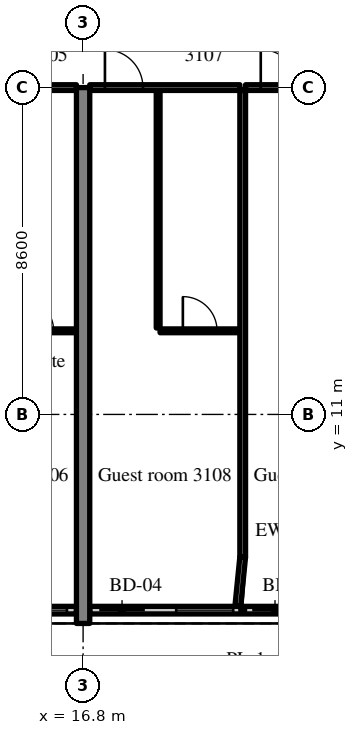
"""IFC4 building model, lengths in metres.
Left out: names, types, materials, properties, quantities, classifications, styles, units other than length and angle.
Written with IfcOpenShell. Run it as: python <this file> out.ifc"""

import sys

from ifc_helpers import new_model, si_unit, direction, frame, frame_2d, origin, place, context, subcontext, project, spatial, rectangle, extrude, source, transform, mapped, element, fill, save


model = new_model("IFC4")
c1 = context("Model", 3, precision=1e-05, world=origin(), true_north=direction((0.0, 1.0)))
c2 = subcontext(c1, "Body", "Model", "MODEL_VIEW")
j1 = project(units=[si_unit("LENGTHUNIT", "METRE"), si_unit("PLANEANGLEUNIT", "RADIAN")], contexts=[c1])
p1 = place(None, origin())
s1 = spatial("IfcSite", under=j1, at=p1, CompositionType="ELEMENT")
p2 = place(p1, origin())
s2 = spatial("IfcBuilding", under=s1, at=p2, CompositionType="ELEMENT")
p3 = place(p2, frame((0.0, 0.0, 129.4)))
s3 = spatial("IfcBuildingStorey", under=s2, at=p3, CompositionType="ELEMENT", Elevation=129.4)
m1 = source(origin(), c2, "Body", "SweptSolid", [
    extrude(rectangle(XDim=14.1, YDim=0.35, at=frame_2d((7.05, 0.0))), origin(), (0.0, 0.0, 1.0), 3.52),
])
p4 = place(p3, frame((16.8, 5.5, 0.0), z_axis=(0.0, 0.0, 1.0), x_axis=(0.0, 1.0, 0.0)))
e1 = element("IfcWall", 1, at=p4, inside=s3, PredefinedType="SHEAR", context=c2, shape_type="MappedRepresentation", body=[
    mapped(m1, transform((0.0, 0.0, 0.0), scale=1.0)),
])
m2 = source(origin(), c2, "Body", "SweptSolid", [
    extrude(rectangle(XDim=8.05, YDim=0.2, at=frame_2d((4.025, 0.0))), origin(), (0.0, 0.0, 1.0), 2.82),
])
p5 = place(p3, frame((8.575, 5.85, 0.0), z_axis=(0.0, 0.0, 1.0), x_axis=(1.0, 0.0, 0.0)))
e2 = element("IfcWall", 2, at=p5, inside=s3, PredefinedType="SOLIDWALL", context=c2, shape_type="MappedRepresentation", body=[
    mapped(m2, transform((0.0, 0.0, 0.0), scale=1.0)),
])
m3 = source(origin(), c2, "Body", "SweptSolid", [
    extrude(rectangle(XDim=1.2, YDim=2.4, at=frame_2d((0.6, 1.2))), frame((0.0, 0.11, 0.0), z_axis=(0.0, -1.0, 0.0), x_axis=(1.0, 0.0, 0.0)), (0.0, 0.0, 1.0), 0.22),
])
p6 = place(p5, frame((0.25, 0.0, 0.0)))
e3 = element("IfcOpeningElement", 3, at=p6, cuts=e2, PredefinedType="OPENING", context=c2, shape_type="MappedRepresentation", body=[
    mapped(m3, transform((0.0, 0.0, 0.0), scale=1.0)),
])
m4 = source(origin(), c2, "Body", "SweptSolid", [
    extrude(rectangle(XDim=1.5, YDim=1.5, at=frame_2d((0.75, 0.75))), frame((0.0, 0.11, 0.0), z_axis=(0.0, -1.0, 0.0), x_axis=(1.0, 0.0, 0.0)), (0.0, 0.0, 1.0), 0.22),
])
p7 = place(p5, frame((2.275, 0.0, 0.9)))
e4 = element("IfcOpeningElement", 4, at=p7, cuts=e2, PredefinedType="OPENING", context=c2, shape_type="MappedRepresentation", body=[
    mapped(m4, transform((0.0, 0.0, 0.0), scale=1.0)),
])
p8 = place(p5, frame((4.275, 0.0, 0.0)))
e5 = element("IfcOpeningElement", 5, at=p8, cuts=e2, PredefinedType="OPENING", context=c2, shape_type="MappedRepresentation", body=[
    mapped(m3, transform((0.0, 0.0, 0.0), scale=1.0)),
])
p9 = place(p5, frame((6.3, 0.0, 0.9)))
e6 = element("IfcOpeningElement", 6, at=p9, cuts=e2, PredefinedType="OPENING", context=c2, shape_type="MappedRepresentation", body=[
    mapped(m4, transform((0.0, 0.0, 0.0), scale=1.0)),
])
m5 = source(origin(), c2, "Body", "SweptSolid", [
    extrude(rectangle(XDim=8.05, YDim=0.2, at=frame_2d((4.025, 0.0))), origin(), (0.0, 0.0, 1.0), 2.82),
])
p10 = place(p3, frame((16.975, 5.85, 0.0), z_axis=(0.0, 0.0, 1.0), x_axis=(1.0, 0.0, 0.0)))
e7 = element("IfcWall", 7, at=p10, inside=s3, PredefinedType="SOLIDWALL", context=c2, shape_type="MappedRepresentation", body=[
    mapped(m5, transform((0.0, 0.0, 0.0), scale=1.0)),
])
p11 = place(p10, frame((0.25, 0.0, 0.0)))
e8 = element("IfcOpeningElement", 8, at=p11, cuts=e7, PredefinedType="OPENING", context=c2, shape_type="MappedRepresentation", body=[
    mapped(m3, transform((0.0, 0.0, 0.0), scale=1.0)),
])
p12 = place(p10, frame((2.275, 0.0, 0.9)))
e9 = element("IfcOpeningElement", 9, at=p12, cuts=e7, PredefinedType="OPENING", context=c2, shape_type="MappedRepresentation", body=[
    mapped(m4, transform((0.0, 0.0, 0.0), scale=1.0)),
])
p13 = place(p10, frame((4.275, 0.0, 0.0)))
e10 = element("IfcOpeningElement", 10, at=p13, cuts=e7, PredefinedType="OPENING", context=c2, shape_type="MappedRepresentation", body=[
    mapped(m3, transform((0.0, 0.0, 0.0), scale=1.0)),
])
p14 = place(p10, frame((6.3, 0.0, 0.9)))
e11 = element("IfcOpeningElement", 11, at=p14, cuts=e7, PredefinedType="OPENING", context=c2, shape_type="MappedRepresentation", body=[
    mapped(m4, transform((0.0, 0.0, 0.0), scale=1.0)),
])
m6 = source(origin(), c2, "Body", "SweptSolid", [
    extrude(rectangle(XDim=2.1, YDim=0.1, at=frame_2d((1.05, 0.0))), origin(), (0.0, 0.0, 1.0), 3.52),
])
p15 = place(p3, frame((14.525, 13.2, 0.0), z_axis=(0.0, 0.0, 1.0), x_axis=(1.0, 0.0, 0.0)))
e12 = element("IfcWall", 12, at=p15, inside=s3, PredefinedType="PARTITIONING", context=c2, shape_type="MappedRepresentation", body=[
    mapped(m6, transform((0.0, 0.0, 0.0), scale=1.0)),
])
m7 = source(origin(), c2, "Body", "SweptSolid", [
    extrude(rectangle(XDim=0.9, YDim=2.1, at=frame_2d((0.45, 1.05))), frame((0.0, 0.06, 0.0), z_axis=(0.0, -1.0, 0.0), x_axis=(1.0, 0.0, 0.0)), (0.0, 0.0, 1.0), 0.12),
])
p16 = place(p15, frame((0.6, 0.0, 0.0)))
e13 = element("IfcOpeningElement", 13, at=p16, cuts=e12, PredefinedType="OPENING", context=c2, shape_type="MappedRepresentation", body=[
    mapped(m7, transform((0.0, 0.0, 0.0), scale=1.0)),
])
m8 = source(origin(), c2, "Body", "SweptSolid", [
    extrude(rectangle(XDim=3.95, YDim=0.15, at=frame_2d((1.975, 0.0))), origin(), (0.0, 0.0, 1.0), 2.82),
])
p17 = place(p3, frame((12.675, 19.6, 0.0), z_axis=(0.0, 0.0, 1.0), x_axis=(1.0, 0.0, 0.0)))
e14 = element("IfcWall", 14, at=p17, inside=s3, PredefinedType="PARTITIONING", context=c2, shape_type="MappedRepresentation", body=[
    mapped(m8, transform((0.0, 0.0, 0.0), scale=1.0)),
])
m9 = source(origin(), c2, "Body", "SweptSolid", [
    extrude(rectangle(XDim=1.0, YDim=2.1, at=frame_2d((0.5, 1.05))), frame((0.0, 0.085, 0.0), z_axis=(0.0, -1.0, 0.0), x_axis=(1.0, 0.0, 0.0)), (0.0, 0.0, 1.0), 0.17),
])
p18 = place(p17, frame((0.4, 0.0, 0.0)))
e15 = element("IfcOpeningElement", 15, at=p18, cuts=e14, PredefinedType="OPENING", context=c2, shape_type="MappedRepresentation", body=[
    mapped(m9, transform((0.0, 0.0, 0.0), scale=1.0)),
])
m10 = source(origin(), c2, "Body", "SweptSolid", [
    extrude(rectangle(XDim=6.25, YDim=0.1, at=frame_2d((3.125, 0.0))), origin(), (0.0, 0.0, 1.0), 3.52),
])
p19 = place(p3, frame((18.775, 13.275, 0.0), z_axis=(0.0, 0.0, 1.0), x_axis=(0.0, 1.0, 0.0)))
e16 = element("IfcWall", 16, at=p19, inside=s3, PredefinedType="PARTITIONING", context=c2, shape_type="MappedRepresentation", body=[
    mapped(m10, transform((0.0, 0.0, 0.0), scale=1.0)),
])
p20 = place(p3, frame((18.825, 13.2, 0.0), z_axis=(0.0, 0.0, 1.0), x_axis=(1.0, 0.0, 0.0)))
e17 = element("IfcWall", 17, at=p20, inside=s3, PredefinedType="PARTITIONING", context=c2, shape_type="MappedRepresentation", body=[
    mapped(m6, transform((0.0, 0.0, 0.0), scale=1.0)),
])
p21 = place(p20, frame((0.6, 0.0, 0.0)))
e18 = element("IfcOpeningElement", 18, at=p21, cuts=e17, PredefinedType="OPENING", context=c2, shape_type="MappedRepresentation", body=[
    mapped(m7, transform((0.0, 0.0, 0.0), scale=1.0)),
])
p22 = place(p3, frame((16.975, 19.6, 0.0), z_axis=(0.0, 0.0, 1.0), x_axis=(1.0, 0.0, 0.0)))
e19 = element("IfcWall", 19, at=p22, inside=s3, PredefinedType="PARTITIONING", context=c2, shape_type="MappedRepresentation", body=[
    mapped(m8, transform((0.0, 0.0, 0.0), scale=1.0)),
])
p23 = place(p22, frame((0.4, 0.0, 0.0)))
e20 = element("IfcOpeningElement", 20, at=p23, cuts=e19, PredefinedType="OPENING", context=c2, shape_type="MappedRepresentation", body=[
    mapped(m9, transform((0.0, 0.0, 0.0), scale=1.0)),
])
p24 = place(p3, frame((21.075, 19.6, 0.0), z_axis=(0.0, 0.0, 1.0), x_axis=(1.0, 0.0, 0.0)))
e21 = element("IfcWall", 21, at=p24, inside=s3, PredefinedType="PARTITIONING", context=c2, shape_type="MappedRepresentation", body=[
    mapped(m8, transform((0.0, 0.0, 0.0), scale=1.0)),
])
p25 = place(p24, frame((0.4, 0.0, 0.0)))
e22 = element("IfcOpeningElement", 22, at=p25, cuts=e21, PredefinedType="OPENING", context=c2, shape_type="MappedRepresentation", body=[
    mapped(m9, transform((0.0, 0.0, 0.0), scale=1.0)),
])
m11 = source(origin(), c2, "Body", "SweptSolid", [
    extrude(rectangle(XDim=12.275, YDim=0.15, at=frame_2d((6.137, 0.0))), origin(), (0.0, 0.0, 1.0), 3.52),
])
p26 = place(p3, frame((21.0, 7.25, 0.0), z_axis=(0.0, 0.0, 1.0), x_axis=(0.0, 1.0, 0.0)))
e23 = element("IfcWall", 23, at=p26, inside=s3, PredefinedType="PARTITIONING", context=c2, shape_type="MappedRepresentation", body=[
    mapped(m11, transform((0.0, 0.0, 0.0), scale=1.0)),
])
m12 = source(origin(), c2, "Body", "SweptSolid", [
    extrude(rectangle(XDim=1.307, YDim=0.15, at=frame_2d((0.653, 0.0))), origin(), (0.0, 0.0, 1.0), 3.52),
])
p27 = place(p3, frame((20.87, 5.95, 0.0), z_axis=(0.0, 0.0, 1.0), x_axis=(0.099411212066, 0.995046436562, 0.0)))
e24 = element("IfcWall", 24, at=p27, inside=s3, PredefinedType="PARTITIONING", context=c2, shape_type="MappedRepresentation", body=[
    mapped(m12, transform((0.0, 0.0, 0.0), scale=1.0)),
])
m13 = source(origin(), c2, "Body", "SweptSolid", [
    extrude(rectangle(XDim=1.5, YDim=1.5, at=frame_2d((0.75, 0.75))), frame((0.0, 0.03, 0.0), z_axis=(0.0, -1.0, 0.0), x_axis=(1.0, 0.0, 0.0)), (0.0, 0.0, 1.0), 0.06),
])
p28 = place(p9, origin())
e25 = element("IfcWindow", 25, at=p28, inside=s3, PartitioningType="SINGLE_PANEL", PredefinedType="WINDOW", context=c2, shape_type="MappedRepresentation", body=[
    mapped(m13, transform((0.0, 0.0, 0.0), scale=1.0)),
])
fill(e6, e25)
m14 = source(origin(), c2, "Body", "SweptSolid", [
    extrude(rectangle(XDim=1.2, YDim=2.4, at=frame_2d((0.6, 1.2))), frame((0.0, 0.025, 0.0), z_axis=(0.0, -1.0, 0.0), x_axis=(1.0, 0.0, 0.0)), (0.0, 0.0, 1.0), 0.05),
])
p29 = place(p11, origin())
e26 = element("IfcDoor", 26, at=p29, inside=s3, OperationType="SLIDING_TO_RIGHT", PredefinedType="DOOR", context=c2, shape_type="MappedRepresentation", body=[
    mapped(m14, transform((0.0, 0.0, 0.0), scale=1.0)),
])
fill(e8, e26)
p30 = place(p12, origin())
e27 = element("IfcWindow", 27, at=p30, inside=s3, PartitioningType="SINGLE_PANEL", PredefinedType="WINDOW", context=c2, shape_type="MappedRepresentation", body=[
    mapped(m13, transform((0.0, 0.0, 0.0), scale=1.0)),
])
fill(e9, e27)
p31 = place(p13, origin())
e28 = element("IfcDoor", 28, at=p31, inside=s3, OperationType="SLIDING_TO_LEFT", PredefinedType="DOOR", context=c2, shape_type="MappedRepresentation", body=[
    mapped(m14, transform((0.0, 0.0, 0.0), scale=1.0)),
])
fill(e10, e28)
m15 = source(origin(), c2, "Body", "SweptSolid", [
    extrude(rectangle(XDim=0.9, YDim=2.1, at=frame_2d((0.45, 1.05))), frame((0.0, 0.025, 0.0), z_axis=(0.0, -1.0, 0.0), x_axis=(1.0, 0.0, 0.0)), (0.0, 0.0, 1.0), 0.05),
])
p32 = place(p16, origin())
e29 = element("IfcDoor", 29, at=p32, inside=s3, OperationType="SINGLE_SWING_LEFT", PredefinedType="DOOR", context=c2, shape_type="MappedRepresentation", body=[
    mapped(m15, transform((0.0, 0.0, 0.0), scale=1.0)),
])
fill(e13, e29)
p33 = place(p21, origin())
e30 = element("IfcDoor", 30, at=p33, inside=s3, OperationType="SINGLE_SWING_LEFT", PredefinedType="DOOR", context=c2, shape_type="MappedRepresentation", body=[
    mapped(m15, transform((0.0, 0.0, 0.0), scale=1.0)),
])
fill(e18, e30)
m16 = source(origin(), c2, "Body", "SweptSolid", [
    extrude(rectangle(XDim=1.0, YDim=2.1, at=frame_2d((0.5, 1.05))), frame((0.0, 0.025, 0.0), z_axis=(0.0, -1.0, 0.0), x_axis=(1.0, 0.0, 0.0)), (0.0, 0.0, 1.0), 0.05),
])
p34 = place(p23, origin())
e31 = element("IfcDoor", 31, at=p34, inside=s3, OperationType="SINGLE_SWING_LEFT", PredefinedType="DOOR", context=c2, shape_type="MappedRepresentation", body=[
    mapped(m16, transform((0.0, 0.0, 0.0), scale=1.0)),
])
fill(e20, e31)
p35 = place(p25, origin())
e32 = element("IfcDoor", 32, at=p35, inside=s3, OperationType="SINGLE_SWING_LEFT", PredefinedType="DOOR", context=c2, shape_type="MappedRepresentation", body=[
    mapped(m16, transform((0.0, 0.0, 0.0), scale=1.0)),
])
fill(e22, e32)
save(model, sys.argv[1])
